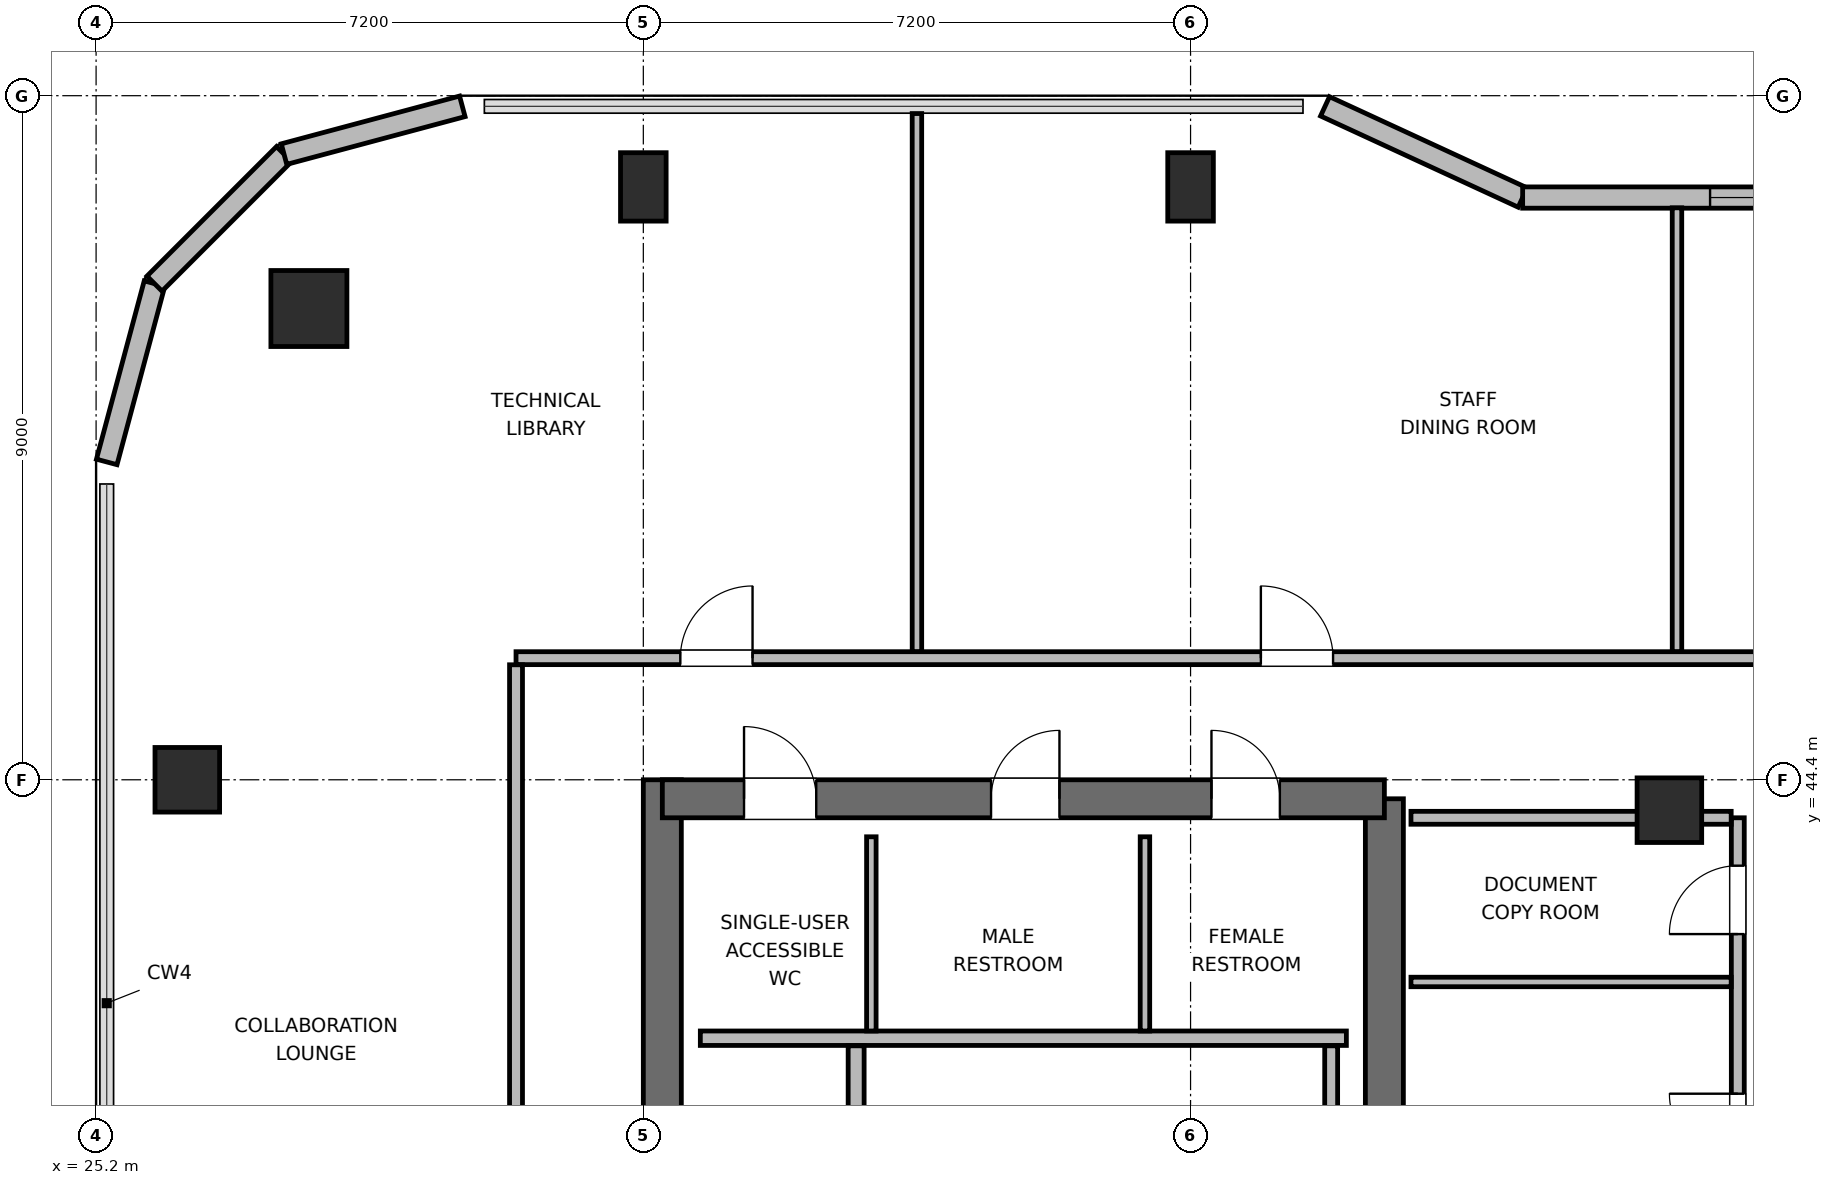
"""IFC4 building model, lengths in metres.
Left out: names, types, materials, properties, quantities, classifications, styles, units other than length and angle.
Written with IfcOpenShell. Run it as: python <this file> out.ifc"""

import sys

from ifc_helpers import new_model, si_unit, direction, frame, frame_2d, origin, origin_2d, place, context, subcontext, project, spatial, rectangle, circle, extrude, element, fill, save


model = new_model("IFC4")
c1 = context("Model", 3, precision=1e-05, world=origin(), true_north=direction((0.0, 1.0)))
c2 = subcontext(c1, "Body", "Model", "MODEL_VIEW")
j1 = project(units=[si_unit("LENGTHUNIT", "METRE"), si_unit("PLANEANGLEUNIT", "RADIAN")], contexts=[c1])
p1 = place(None, origin())
s1 = spatial("IfcSite", under=j1, at=p1, CompositionType="ELEMENT")
p2 = place(p1, origin())
s2 = spatial("IfcBuilding", under=s1, at=p2, CompositionType="ELEMENT")
p3 = place(p2, frame((0.0, 0.0, 314.1)))
s3 = spatial("IfcBuildingStorey", under=s2, at=p3, CompositionType="ELEMENT", Elevation=314.1)
p4 = place(p3, frame((32.65, 27.6, 0.0), z_axis=(0.0, 0.0, 1.0), x_axis=(0.0, 1.0, 0.0)))
e1 = element("IfcWall", 1, at=p4, inside=s3, PredefinedType="SHEAR", context=c2, shape_type="SweptSolid", body=[
    extrude(rectangle(XDim=16.8, YDim=0.5, at=frame_2d((8.4, 0.0))), origin(), (0.0, 0.0, 1.0), 3.9),
])
p5 = place(p3, frame((42.15, 37.8, 0.0), z_axis=(0.0, 0.0, 1.0), x_axis=(0.0, 1.0, 0.0)))
e2 = element("IfcWall", 2, at=p5, inside=s3, PredefinedType="SHEAR", context=c2, shape_type="SweptSolid", body=[
    extrude(rectangle(XDim=6.35, YDim=0.5, at=frame_2d((3.175, 0.0))), origin(), (0.0, 0.0, 1.0), 3.9),
])
p6 = place(p3, frame((32.65, 44.15, 0.0), z_axis=(0.0, 0.0, 1.0), x_axis=(1.0, 0.0, 0.0)))
e3 = element("IfcWall", 3, at=p6, inside=s3, PredefinedType="SHEAR", context=c2, shape_type="SweptSolid", body=[
    extrude(rectangle(XDim=9.5, YDim=0.5, at=frame_2d((4.75, 0.0))), origin(), (0.0, 0.0, 1.0), 3.9),
])
p7 = place(p6, frame((1.075, 0.0, 0.0)))
e4 = element("IfcOpeningElement", 4, at=p7, cuts=e3, PredefinedType="OPENING", context=c2, shape_type="SweptSolid", body=[
    extrude(rectangle(XDim=0.95, YDim=2.04, at=frame_2d((0.475, 1.02))), frame((0.0, 0.26, 0.0), z_axis=(0.0, -1.0, 0.0), x_axis=(1.0, 0.0, 0.0)), (0.0, 0.0, 1.0), 0.52),
])
p8 = place(p6, frame((4.325, 0.0, 0.0)))
e5 = element("IfcOpeningElement", 5, at=p8, cuts=e3, PredefinedType="OPENING", context=c2, shape_type="SweptSolid", body=[
    extrude(rectangle(XDim=0.9, YDim=2.02, at=frame_2d((0.45, 1.01))), frame((0.0, 0.26, 0.0), z_axis=(0.0, -1.0, 0.0), x_axis=(1.0, 0.0, 0.0)), (0.0, 0.0, 1.0), 0.52),
])
p9 = place(p6, frame((7.225, 0.0, 0.0)))
e6 = element("IfcOpeningElement", 6, at=p9, cuts=e3, PredefinedType="OPENING", context=c2, shape_type="SweptSolid", body=[
    extrude(rectangle(XDim=0.9, YDim=2.02, at=frame_2d((0.45, 1.01))), frame((0.0, 0.26, 0.0), z_axis=(0.0, -1.0, 0.0), x_axis=(1.0, 0.0, 0.0)), (0.0, 0.0, 1.0), 0.52),
])
p10 = place(p3, frame((28.0, 50.6, 0.0), z_axis=(0.0, 0.0, 1.0), x_axis=(1.0, 0.0, 0.0)))
e7 = element("IfcColumn", 7, at=p10, inside=s3, PredefinedType="COLUMN", context=c2, shape_type="SweptSolid", body=[
    extrude(circle(Radius=0.5, at=origin_2d()), origin(), (0.0, 0.0, 1.0), 3.9),
])
for number, where, z_axis, x_axis in (
    (8, (32.4, 52.2, 0.0), (0.0, 0.0, 1.0), (1.0, 0.0, 0.0)),
    (9, (39.6, 52.2, 0.0), (0.0, 0.0, 1.0), (1.0, 0.0, 0.0)),
):
    element("IfcColumn", number, at=place(p3, frame(where, z_axis=z_axis, x_axis=x_axis)), inside=s3, PredefinedType="COLUMN", context=c2, shape_type="SweptSolid", body=[
        extrude(rectangle(XDim=0.6, YDim=0.9, at=origin_2d()), origin(), (0.0, 0.0, 1.0), 3.9),
    ])
for number, where, z_axis, x_axis in (
    (10, (26.4, 44.4, 0.0), (0.0, 0.0, 1.0), (1.0, 0.0, 0.0)),
    (11, (45.9, 44.0, 0.0), (0.0, 0.0, 1.0), (1.0, 0.0, 0.0)),
):
    element("IfcColumn", number, at=place(p3, frame(where, z_axis=z_axis, x_axis=x_axis)), inside=s3, PredefinedType="COLUMN", context=c2, shape_type="SweptSolid", body=[
        extrude(rectangle(XDim=0.85, YDim=0.85, at=origin_2d()), origin(), (0.0, 0.0, 1.0), 3.9),
    ])
p11 = place(p3, frame((25.34, 48.582, 0.0), z_axis=(0.0, 0.0, 1.0), x_axis=(0.258751159445, 0.965944013639, 0.0)))
e12 = element("IfcWall", 12, at=p11, inside=s3, PredefinedType="SOLIDWALL", context=c2, shape_type="SweptSolid", body=[
    extrude(rectangle(XDim=2.429, YDim=0.28, at=frame_2d((1.214, 0.0))), origin(), (0.0, 0.0, 1.0), 3.68),
])
p12 = place(p3, frame((25.969, 50.927, 0.0), z_axis=(0.0, 0.0, 1.0), x_axis=(0.707106781187, 0.707106781187, 0.0)))
e13 = element("IfcWall", 13, at=p12, inside=s3, PredefinedType="SOLIDWALL", context=c2, shape_type="SweptSolid", body=[
    extrude(rectangle(XDim=2.41, YDim=0.28, at=frame_2d((1.205, 0.0))), origin(), (0.0, 0.0, 1.0), 3.68),
])
p13 = place(p3, frame((27.673, 52.632, 0.0), z_axis=(0.0, 0.0, 1.0), x_axis=(0.965937282298, 0.25877628691, 0.0)))
e14 = element("IfcWall", 14, at=p13, inside=s3, PredefinedType="SOLIDWALL", context=c2, shape_type="SweptSolid", body=[
    extrude(rectangle(XDim=2.428, YDim=0.28, at=frame_2d((1.214, 0.0))), origin(), (0.0, 0.0, 1.0), 3.68),
])
p14 = place(p3, frame((41.369, 53.26, 0.0), z_axis=(0.0, 0.0, 1.0), x_axis=(0.907956889006, -0.419063584324, 0.0)))
e15 = element("IfcWall", 15, at=p14, inside=s3, PredefinedType="SOLIDWALL", context=c2, shape_type="SweptSolid", body=[
    extrude(rectangle(XDim=2.864, YDim=0.28, at=frame_2d((1.432, 0.0))), origin(), (0.0, 0.0, 1.0), 2.265),
])
p15 = place(p3, frame((43.969, 52.06, 0.0), z_axis=(0.0, 0.0, 1.0), x_axis=(1.0, 0.0, 0.0)))
e16 = element("IfcWall", 16, at=p15, inside=s3, PredefinedType="SOLIDWALL", context=c2, shape_type="SweptSolid", body=[
    extrude(rectangle(XDim=4.691, YDim=0.28, at=frame_2d((2.345, 0.0))), origin(), (0.0, 0.0, 1.0), 2.265),
])
p16 = place(p15, frame((2.466, 0.0, 0.85)))
e17 = element("IfcOpeningElement", 17, at=p16, cuts=e16, PredefinedType="OPENING", context=c2, shape_type="SweptSolid", body=[
    extrude(rectangle(XDim=1.6, YDim=1.0, at=frame_2d((0.8, 0.5))), frame((0.0, 0.15, 0.0), z_axis=(0.0, -1.0, 0.0), x_axis=(1.0, 0.0, 0.0)), (0.0, 0.0, 1.0), 0.3),
])
p17 = place(p3, frame((33.15, 41.0, 0.0), z_axis=(0.0, 0.0, 1.0), x_axis=(1.0, 0.0, 0.0)))
e18 = element("IfcWall", 18, at=p17, inside=s3, PredefinedType="PLUMBINGWALL", context=c2, shape_type="SweptSolid", body=[
    extrude(rectangle(XDim=8.5, YDim=0.19, at=frame_2d((4.25, 0.0))), origin(), (0.0, 0.0, 1.0), 3.68),
])
for number, where, z_axis, x_axis in (
    (19, (35.4, 41.095, 0.0), (0.0, 0.0, 1.0), (0.0, 1.0, 0.0)),
    (20, (39.0, 41.095, 0.0), (0.0, 0.0, 1.0), (0.0, 1.0, 0.0)),
):
    element("IfcWall", number, at=place(p3, frame(where, z_axis=z_axis, x_axis=x_axis)), inside=s3, PredefinedType="PARTITIONING", context=c2, shape_type="SweptSolid", body=[
        extrude(rectangle(XDim=2.555, YDim=0.125, at=frame_2d((1.277, 0.0))), origin(), (0.0, 0.0, 1.0), 3.68),
    ])
p18 = place(p3, frame((35.2, 39.58, 0.0), z_axis=(0.0, 0.0, 1.0), x_axis=(0.0, 1.0, 0.0)))
e21 = element("IfcWall", 21, at=p18, inside=s3, PredefinedType="PARTITIONING", context=c2, shape_type="SweptSolid", body=[
    extrude(rectangle(XDim=1.32, YDim=0.21, at=frame_2d((0.66, 0.0))), origin(), (0.0, 0.0, 1.0), 3.68),
])
p19 = place(p3, frame((41.45, 38.087, 0.0), z_axis=(0.0, 0.0, 1.0), x_axis=(0.0, 1.0, 0.0)))
e22 = element("IfcWall", 22, at=p19, inside=s3, PredefinedType="PARTITIONING", context=c2, shape_type="SweptSolid", body=[
    extrude(rectangle(XDim=2.813, YDim=0.17, at=frame_2d((1.406, 0.0))), origin(), (0.0, 0.0, 1.0), 3.68),
])
p20 = place(p3, frame((46.8, 37.9, 0.0), z_axis=(0.0, 0.0, 1.0), x_axis=(0.0, 1.0, 0.0)))
e23 = element("IfcWall", 23, at=p20, inside=s3, PredefinedType="PARTITIONING", context=c2, shape_type="SweptSolid", body=[
    extrude(rectangle(XDim=6.0, YDim=0.17, at=frame_2d((3.0, 0.0))), origin(), (0.0, 0.0, 1.0), 3.68),
])
p21 = place(p20, frame((1.47, 0.0, 0.0)))
e24 = element("IfcOpeningElement", 24, at=p21, cuts=e23, PredefinedType="OPENING", context=c2, shape_type="SweptSolid", body=[
    extrude(rectangle(XDim=0.9, YDim=2.02, at=frame_2d((0.45, 1.01))), frame((0.0, 0.095, 0.0), z_axis=(0.0, -1.0, 0.0), x_axis=(1.0, 0.0, 0.0)), (0.0, 0.0, 1.0), 0.19),
])
p22 = place(p20, frame((4.47, 0.0, 0.0)))
e25 = element("IfcOpeningElement", 25, at=p22, cuts=e23, PredefinedType="OPENING", context=c2, shape_type="SweptSolid", body=[
    extrude(rectangle(XDim=0.9, YDim=2.02, at=frame_2d((0.45, 1.01))), frame((0.0, 0.095, 0.0), z_axis=(0.0, -1.0, 0.0), x_axis=(1.0, 0.0, 0.0)), (0.0, 0.0, 1.0), 0.19),
])
p23 = place(p3, frame((42.5, 43.9, 0.0), z_axis=(0.0, 0.0, 1.0), x_axis=(1.0, 0.0, 0.0)))
e26 = element("IfcWall", 26, at=p23, inside=s3, PredefinedType="PARTITIONING", context=c2, shape_type="SweptSolid", body=[
    extrude(rectangle(XDim=4.213, YDim=0.17, at=frame_2d((2.106, 0.0))), origin(), (0.0, 0.0, 1.0), 2.765),
])
p24 = place(p3, frame((42.5, 41.74, 0.0), z_axis=(0.0, 0.0, 1.0), x_axis=(1.0, 0.0, 0.0)))
e27 = element("IfcWall", 27, at=p24, inside=s3, PredefinedType="PARTITIONING", context=c2, shape_type="SweptSolid", body=[
    extrude(rectangle(XDim=4.213, YDim=0.125, at=frame_2d((2.106, 0.0))), origin(), (0.0, 0.0, 1.0), 3.68),
])
p25 = place(p3, frame((30.725, 46.0, 0.0), z_axis=(0.0, 0.0, 1.0), x_axis=(1.0, 0.0, 0.0)))
e28 = element("IfcWall", 28, at=p25, inside=s3, PredefinedType="PARTITIONING", context=c2, shape_type="SweptSolid", body=[
    extrude(rectangle(XDim=34.55, YDim=0.17, at=frame_2d((17.275, 0.0))), origin(), (0.0, 0.0, 1.0), 3.68),
])
p26 = place(p25, frame((2.162, 0.0, 0.0)))
e29 = element("IfcOpeningElement", 29, at=p26, cuts=e28, PredefinedType="OPENING", context=c2, shape_type="SweptSolid", body=[
    extrude(rectangle(XDim=0.95, YDim=2.04, at=frame_2d((0.475, 1.02))), frame((0.0, 0.095, 0.0), z_axis=(0.0, -1.0, 0.0), x_axis=(1.0, 0.0, 0.0)), (0.0, 0.0, 1.0), 0.19),
])
p27 = place(p25, frame((9.8, 0.0, 0.0)))
e30 = element("IfcOpeningElement", 30, at=p27, cuts=e28, PredefinedType="OPENING", context=c2, shape_type="SweptSolid", body=[
    extrude(rectangle(XDim=0.95, YDim=2.04, at=frame_2d((0.475, 1.02))), frame((0.0, 0.095, 0.0), z_axis=(0.0, -1.0, 0.0), x_axis=(1.0, 0.0, 0.0)), (0.0, 0.0, 1.0), 0.19),
])
p28 = place(p25, frame((19.8, 0.0, 0.0)))
e31 = element("IfcOpeningElement", 31, at=p28, cuts=e28, PredefinedType="OPENING", context=c2, shape_type="SweptSolid", body=[
    extrude(rectangle(XDim=0.95, YDim=2.04, at=frame_2d((0.475, 1.02))), frame((0.0, 0.095, 0.0), z_axis=(0.0, -1.0, 0.0), x_axis=(1.0, 0.0, 0.0)), (0.0, 0.0, 1.0), 0.19),
])
p29 = place(p25, frame((29.438, 0.0, 0.0)))
e32 = element("IfcOpeningElement", 32, at=p29, cuts=e28, PredefinedType="OPENING", context=c2, shape_type="SweptSolid", body=[
    extrude(rectangle(XDim=0.95, YDim=2.04, at=frame_2d((0.475, 1.02))), frame((0.0, 0.095, 0.0), z_axis=(0.0, -1.0, 0.0), x_axis=(1.0, 0.0, 0.0)), (0.0, 0.0, 1.0), 0.19),
])
p30 = place(p3, frame((30.725, 26.087, 0.0), z_axis=(0.0, 0.0, 1.0), x_axis=(0.0, 1.0, 0.0)))
e33 = element("IfcWall", 33, at=p30, inside=s3, PredefinedType="PARTITIONING", context=c2, shape_type="SweptSolid", body=[
    extrude(rectangle(XDim=19.826, YDim=0.17, at=frame_2d((9.913, 0.0))), origin(), (0.0, 0.0, 1.0), 3.68),
])
p31 = place(p30, frame((9.438, 0.0, 0.0)))
e34 = element("IfcOpeningElement", 34, at=p31, cuts=e33, PredefinedType="OPENING", context=c2, shape_type="SweptSolid", body=[
    extrude(rectangle(XDim=0.95, YDim=2.04, at=frame_2d((0.475, 1.02))), frame((0.0, 0.095, 0.0), z_axis=(0.0, -1.0, 0.0), x_axis=(1.0, 0.0, 0.0)), (0.0, 0.0, 1.0), 0.19),
])
p32 = place(p3, frame((36.0, 46.087, 0.0), z_axis=(0.0, 0.0, 1.0), x_axis=(0.0, 1.0, 0.0)))
e35 = element("IfcWall", 35, at=p32, inside=s3, PredefinedType="PARTITIONING", context=c2, shape_type="SweptSolid", body=[
    extrude(rectangle(XDim=7.078, YDim=0.125, at=frame_2d((3.539, 0.0))), origin(), (0.0, 0.0, 1.0), 3.68),
])
p33 = place(p3, frame((46.0, 46.087, 0.0), z_axis=(0.0, 0.0, 1.0), x_axis=(0.0, 1.0, 0.0)))
e36 = element("IfcWall", 36, at=p33, inside=s3, PredefinedType="PARTITIONING", context=c2, shape_type="SweptSolid", body=[
    extrude(rectangle(XDim=5.838, YDim=0.125, at=frame_2d((2.919, 0.0))), origin(), (0.0, 0.0, 1.0), 3.68),
])
p34 = place(p16, origin())
e37 = element("IfcWindow", 37, at=p34, inside=s3, PartitioningType="SINGLE_PANEL", PredefinedType="WINDOW", context=c2, shape_type="SweptSolid", body=[
    extrude(rectangle(XDim=1.6, YDim=1.0, at=frame_2d((0.8, 0.5))), frame((0.0, 0.03, 0.0), z_axis=(0.0, -1.0, 0.0), x_axis=(1.0, 0.0, 0.0)), (0.0, 0.0, 1.0), 0.06),
])
fill(e17, e37)
p35 = place(p7, origin())
e38 = element("IfcDoor", 38, at=p35, inside=s3, OperationType="SINGLE_SWING_LEFT", PredefinedType="DOOR", context=c2, shape_type="SweptSolid", body=[
    extrude(rectangle(XDim=0.95, YDim=2.04, at=frame_2d((0.475, 1.02))), frame((0.0, 0.025, 0.0), z_axis=(0.0, -1.0, 0.0), x_axis=(1.0, 0.0, 0.0)), (0.0, 0.0, 1.0), 0.05),
])
fill(e4, e38)
p36 = place(p8, origin())
e39 = element("IfcDoor", 39, at=p36, inside=s3, OperationType="SINGLE_SWING_RIGHT", PredefinedType="DOOR", context=c2, shape_type="SweptSolid", body=[
    extrude(rectangle(XDim=0.9, YDim=2.02, at=frame_2d((0.45, 1.01))), frame((0.0, 0.025, 0.0), z_axis=(0.0, -1.0, 0.0), x_axis=(1.0, 0.0, 0.0)), (0.0, 0.0, 1.0), 0.05),
])
fill(e5, e39)
p37 = place(p9, origin())
e40 = element("IfcDoor", 40, at=p37, inside=s3, OperationType="SINGLE_SWING_LEFT", PredefinedType="DOOR", context=c2, shape_type="SweptSolid", body=[
    extrude(rectangle(XDim=0.9, YDim=2.02, at=frame_2d((0.45, 1.01))), frame((0.0, 0.025, 0.0), z_axis=(0.0, -1.0, 0.0), x_axis=(1.0, 0.0, 0.0)), (0.0, 0.0, 1.0), 0.05),
])
fill(e6, e40)
p38 = place(p21, origin())
e41 = element("IfcDoor", 41, at=p38, inside=s3, OperationType="SINGLE_SWING_RIGHT", PredefinedType="DOOR", context=c2, shape_type="SweptSolid", body=[
    extrude(rectangle(XDim=0.9, YDim=2.02, at=frame_2d((0.45, 1.01))), frame((0.0, 0.025, 0.0), z_axis=(0.0, -1.0, 0.0), x_axis=(1.0, 0.0, 0.0)), (0.0, 0.0, 1.0), 0.05),
])
fill(e24, e41)
p39 = place(p22, origin())
e42 = element("IfcDoor", 42, at=p39, inside=s3, OperationType="SINGLE_SWING_LEFT", PredefinedType="DOOR", context=c2, shape_type="SweptSolid", body=[
    extrude(rectangle(XDim=0.9, YDim=2.02, at=frame_2d((0.45, 1.01))), frame((0.0, 0.025, 0.0), z_axis=(0.0, -1.0, 0.0), x_axis=(1.0, 0.0, 0.0)), (0.0, 0.0, 1.0), 0.05),
])
fill(e25, e42)
p40 = place(p26, origin())
e43 = element("IfcDoor", 43, at=p40, inside=s3, OperationType="SINGLE_SWING_RIGHT", PredefinedType="DOOR", context=c2, shape_type="SweptSolid", body=[
    extrude(rectangle(XDim=0.95, YDim=2.04, at=frame_2d((0.475, 1.02))), frame((0.0, 0.025, 0.0), z_axis=(0.0, -1.0, 0.0), x_axis=(1.0, 0.0, 0.0)), (0.0, 0.0, 1.0), 0.05),
])
fill(e29, e43)
p41 = place(p27, origin())
e44 = element("IfcDoor", 44, at=p41, inside=s3, OperationType="SINGLE_SWING_LEFT", PredefinedType="DOOR", context=c2, shape_type="SweptSolid", body=[
    extrude(rectangle(XDim=0.95, YDim=2.04, at=frame_2d((0.475, 1.02))), frame((0.0, 0.025, 0.0), z_axis=(0.0, -1.0, 0.0), x_axis=(1.0, 0.0, 0.0)), (0.0, 0.0, 1.0), 0.05),
])
fill(e30, e44)
save(model, sys.argv[1])
